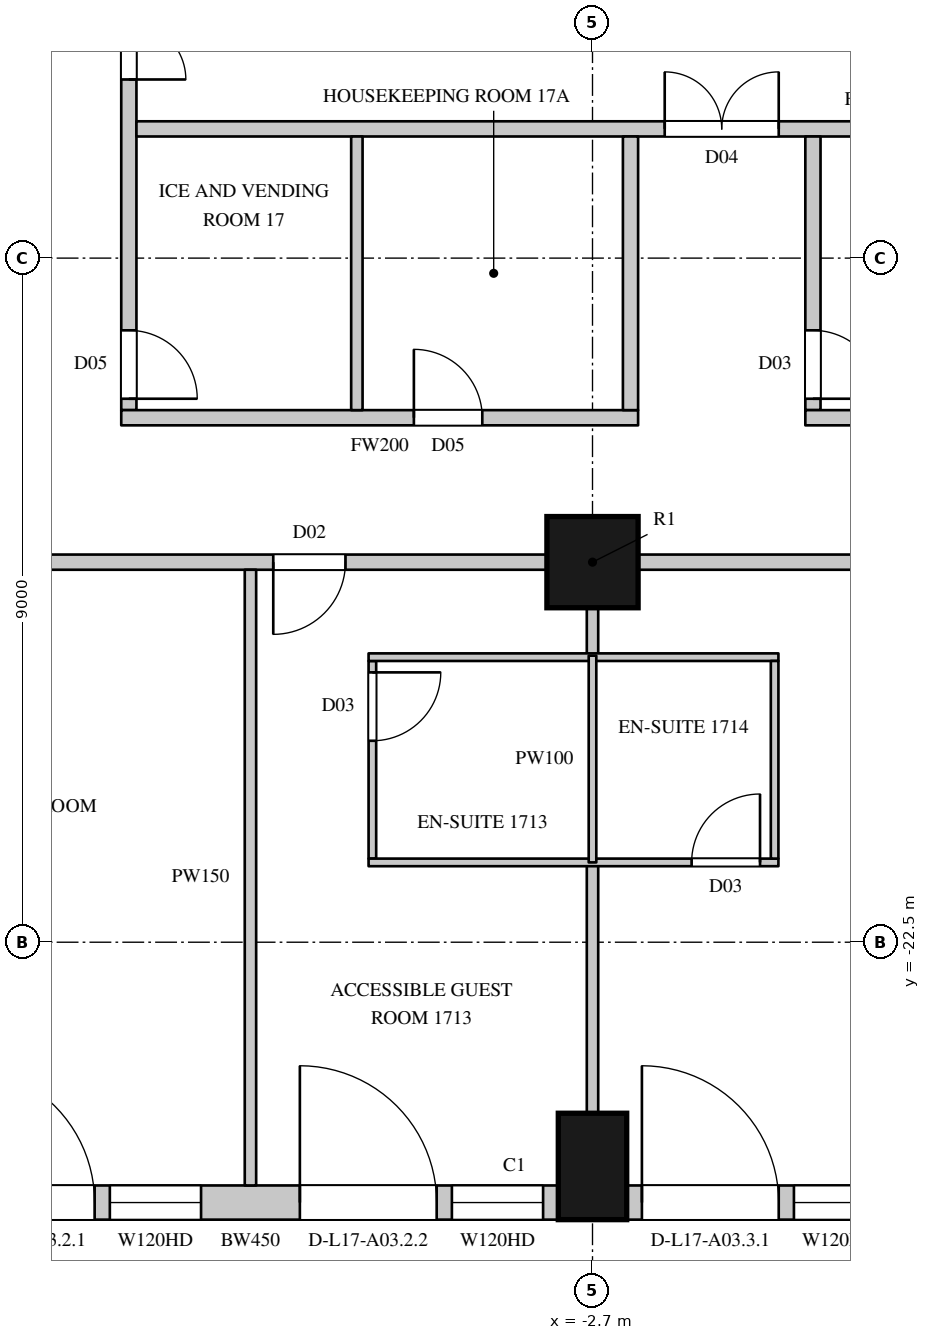
"""IFC4 building model, lengths in metres.
Left out: names, types, materials, properties, quantities, classifications, styles, units other than length and angle.
Written with IfcOpenShell. Run it as: python <this file> out.ifc"""

import sys

from ifc_helpers import new_model, si_unit, direction, frame, frame_2d, origin, origin_2d, place, context, subcontext, project, spatial, rectangle, circle, extrude, element, fill, save


model = new_model("IFC4")
c1 = context("Model", 3, precision=1e-05, world=origin(), true_north=direction((0.0, 1.0)))
c2 = subcontext(c1, "Body", "Model", "MODEL_VIEW")
j1 = project(units=[si_unit("LENGTHUNIT", "METRE"), si_unit("PLANEANGLEUNIT", "RADIAN")], contexts=[c1])
p1 = place(None, origin())
s1 = spatial("IfcSite", under=j1, at=p1, CompositionType="ELEMENT")
p2 = place(p1, origin())
s2 = spatial("IfcBuilding", under=s1, at=p2, CompositionType="ELEMENT")
p3 = place(p2, frame((0.0, 0.0, 91.5)))
s3 = spatial("IfcBuildingStorey", under=s2, at=p3, CompositionType="ELEMENT", Elevation=91.5)
p4 = place(p3, frame((-2.7, -25.45, 0.0), z_axis=(0.0, 0.0, 1.0), x_axis=(1.0, 0.0, 0.0)))
e1 = element("IfcColumn", 1, at=p4, inside=s3, PredefinedType="COLUMN", context=c2, shape_type="SweptSolid", body=[
    extrude(rectangle(XDim=0.9, YDim=1.4, at=origin_2d()), origin(), (0.0, 0.0, 1.0), 3.6),
])
p5 = place(p3, frame((-2.7, -17.5, 0.0), z_axis=(0.0, 0.0, 1.0), x_axis=(1.0, 0.0, 0.0)))
e2 = element("IfcColumn", 2, at=p5, inside=s3, PredefinedType="COLUMN", context=c2, shape_type="SweptSolid", body=[
    extrude(circle(Radius=0.6, at=origin_2d()), origin(), (0.0, 0.0, 1.0), 3.6),
])
p6 = place(p3, frame((-11.25, -25.925, 0.0), z_axis=(0.0, 0.0, 1.0), x_axis=(1.0, 0.0, 0.0)))
e3 = element("IfcWall", 3, at=p6, inside=s3, PredefinedType="SOLIDWALL", context=c2, shape_type="SweptSolid", body=[
    extrude(rectangle(XDim=8.1, YDim=0.45, at=frame_2d((4.05, 0.0))), origin(), (0.0, 0.0, 1.0), 3.3),
])
p7 = place(p6, frame((0.2, 0.0, 0.0)))
e4 = element("IfcOpeningElement", 4, at=p7, cuts=e3, PredefinedType="OPENING", context=c2, shape_type="SweptSolid", body=[
    extrude(rectangle(XDim=1.8, YDim=2.4, at=frame_2d((0.9, 1.2))), frame((0.0, 0.235, 0.0), z_axis=(0.0, -1.0, 0.0), x_axis=(1.0, 0.0, 0.0)), (0.0, 0.0, 1.0), 0.47),
])
p8 = place(p6, frame((2.2, 0.0, 1.05)))
e5 = element("IfcOpeningElement", 5, at=p8, cuts=e3, PredefinedType="OPENING", context=c2, shape_type="SweptSolid", body=[
    extrude(rectangle(XDim=1.2, YDim=2.0, at=frame_2d((0.6, 1.0))), frame((0.0, 0.235, 0.0), z_axis=(0.0, -1.0, 0.0), x_axis=(1.0, 0.0, 0.0)), (0.0, 0.0, 1.0), 0.47),
])
p9 = place(p6, frame((4.7, 0.0, 0.0)))
e6 = element("IfcOpeningElement", 6, at=p9, cuts=e3, PredefinedType="OPENING", context=c2, shape_type="SweptSolid", body=[
    extrude(rectangle(XDim=1.8, YDim=2.4, at=frame_2d((0.9, 1.2))), frame((0.0, 0.235, 0.0), z_axis=(0.0, -1.0, 0.0), x_axis=(1.0, 0.0, 0.0)), (0.0, 0.0, 1.0), 0.47),
])
p10 = place(p6, frame((6.7, 0.0, 1.05)))
e7 = element("IfcOpeningElement", 7, at=p10, cuts=e3, PredefinedType="OPENING", context=c2, shape_type="SweptSolid", body=[
    extrude(rectangle(XDim=1.2, YDim=2.0, at=frame_2d((0.6, 1.0))), frame((0.0, 0.235, 0.0), z_axis=(0.0, -1.0, 0.0), x_axis=(1.0, 0.0, 0.0)), (0.0, 0.0, 1.0), 0.47),
])
p11 = place(p3, frame((-2.25, -25.925, 0.0), z_axis=(0.0, 0.0, 1.0), x_axis=(1.0, 0.0, 0.0)))
e8 = element("IfcWall", 8, at=p11, inside=s3, PredefinedType="SOLIDWALL", context=c2, shape_type="SweptSolid", body=[
    extrude(rectangle(XDim=8.1, YDim=0.45, at=frame_2d((4.05, 0.0))), origin(), (0.0, 0.0, 1.0), 3.3),
])
p12 = place(p11, frame((0.2, 0.0, 0.0)))
e9 = element("IfcOpeningElement", 9, at=p12, cuts=e8, PredefinedType="OPENING", context=c2, shape_type="SweptSolid", body=[
    extrude(rectangle(XDim=1.8, YDim=2.4, at=frame_2d((0.9, 1.2))), frame((0.0, 0.235, 0.0), z_axis=(0.0, -1.0, 0.0), x_axis=(1.0, 0.0, 0.0)), (0.0, 0.0, 1.0), 0.47),
])
p13 = place(p11, frame((2.2, 0.0, 1.05)))
e10 = element("IfcOpeningElement", 10, at=p13, cuts=e8, PredefinedType="OPENING", context=c2, shape_type="SweptSolid", body=[
    extrude(rectangle(XDim=1.2, YDim=2.0, at=frame_2d((0.6, 1.0))), frame((0.0, 0.235, 0.0), z_axis=(0.0, -1.0, 0.0), x_axis=(1.0, 0.0, 0.0)), (0.0, 0.0, 1.0), 0.47),
])
p14 = place(p11, frame((4.7, 0.0, 0.0)))
e11 = element("IfcOpeningElement", 11, at=p14, cuts=e8, PredefinedType="OPENING", context=c2, shape_type="SweptSolid", body=[
    extrude(rectangle(XDim=1.8, YDim=2.4, at=frame_2d((0.9, 1.2))), frame((0.0, 0.235, 0.0), z_axis=(0.0, -1.0, 0.0), x_axis=(1.0, 0.0, 0.0)), (0.0, 0.0, 1.0), 0.47),
])
p15 = place(p11, frame((6.7, 0.0, 1.05)))
e12 = element("IfcOpeningElement", 12, at=p15, cuts=e8, PredefinedType="OPENING", context=c2, shape_type="SweptSolid", body=[
    extrude(rectangle(XDim=1.2, YDim=2.0, at=frame_2d((0.6, 1.0))), frame((0.0, 0.235, 0.0), z_axis=(0.0, -1.0, 0.0), x_axis=(1.0, 0.0, 0.0)), (0.0, 0.0, 1.0), 0.47),
])
p16 = place(p3, frame((-11.1, -17.5, 0.0), z_axis=(0.0, 0.0, 1.0), x_axis=(1.0, 0.0, 0.0)))
e13 = element("IfcWall", 13, at=p16, inside=s3, PredefinedType="PARTITIONING", context=c2, shape_type="SweptSolid", body=[
    extrude(rectangle(XDim=7.8, YDim=0.2, at=frame_2d((3.9, 0.0))), origin(), (0.0, 0.0, 1.0), 2.75),
])
p17 = place(p16, frame((4.2, 0.0, 0.0)))
e14 = element("IfcOpeningElement", 14, at=p17, cuts=e13, PredefinedType="OPENING", context=c2, shape_type="SweptSolid", body=[
    extrude(rectangle(XDim=0.95, YDim=2.2, at=frame_2d((0.475, 1.1))), frame((0.0, 0.11, 0.0), z_axis=(0.0, -1.0, 0.0), x_axis=(1.0, 0.0, 0.0)), (0.0, 0.0, 1.0), 0.22),
])
p18 = place(p3, frame((-2.1, -17.5, 0.0), z_axis=(0.0, 0.0, 1.0), x_axis=(1.0, 0.0, 0.0)))
e15 = element("IfcWall", 15, at=p18, inside=s3, PredefinedType="PARTITIONING", context=c2, shape_type="SweptSolid", body=[
    extrude(rectangle(XDim=7.8, YDim=0.2, at=frame_2d((3.9, 0.0))), origin(), (0.0, 0.0, 1.0), 2.75),
])
p19 = place(p18, frame((4.15, 0.0, 0.0)))
e16 = element("IfcOpeningElement", 16, at=p19, cuts=e15, PredefinedType="OPENING", context=c2, shape_type="SweptSolid", body=[
    extrude(rectangle(XDim=0.95, YDim=2.2, at=frame_2d((0.475, 1.1))), frame((0.0, 0.11, 0.0), z_axis=(0.0, -1.0, 0.0), x_axis=(1.0, 0.0, 0.0)), (0.0, 0.0, 1.0), 0.22),
])
p20 = place(p3, frame((-8.8, -15.5, 0.0), z_axis=(0.0, 0.0, 1.0), x_axis=(0.0, 1.0, 0.0)))
e17 = element("IfcWall", 17, at=p20, inside=s3, PredefinedType="PARTITIONING", context=c2, shape_type="SweptSolid", body=[
    extrude(rectangle(XDim=27.2, YDim=0.2, at=frame_2d((13.6, 0.0))), origin(), (0.0, 0.0, 1.0), 3.3),
])
p21 = place(p20, frame((19.25, 0.0, 0.0)))
e18 = element("IfcOpeningElement", 18, at=p21, cuts=e17, PredefinedType="OPENING", context=c2, shape_type="SweptSolid", body=[
    extrude(rectangle(XDim=1.5, YDim=2.2, at=frame_2d((0.75, 1.1))), frame((0.0, 0.11, 0.0), z_axis=(0.0, -1.0, 0.0), x_axis=(1.0, 0.0, 0.0)), (0.0, 0.0, 1.0), 0.22),
])
p22 = place(p20, frame((4.35, 0.0, 0.0)))
e19 = element("IfcOpeningElement", 19, at=p22, cuts=e17, PredefinedType="OPENING", context=c2, shape_type="SweptSolid", body=[
    extrude(rectangle(XDim=1.5, YDim=2.2, at=frame_2d((0.75, 1.1))), frame((0.0, 0.11, 0.0), z_axis=(0.0, -1.0, 0.0), x_axis=(1.0, 0.0, 0.0)), (0.0, 0.0, 1.0), 0.22),
])
p23 = place(p20, frame((25.55, 0.0, 0.0)))
e20 = element("IfcOpeningElement", 20, at=p23, cuts=e17, PredefinedType="OPENING", context=c2, shape_type="SweptSolid", body=[
    extrude(rectangle(XDim=1.5, YDim=2.2, at=frame_2d((0.75, 1.1))), frame((0.0, 0.11, 0.0), z_axis=(0.0, -1.0, 0.0), x_axis=(1.0, 0.0, 0.0)), (0.0, 0.0, 1.0), 0.22),
])
p24 = place(p20, frame((0.15, 0.0, 0.0)))
e21 = element("IfcOpeningElement", 21, at=p24, cuts=e17, PredefinedType="OPENING", context=c2, shape_type="SweptSolid", body=[
    extrude(rectangle(XDim=0.9, YDim=2.2, at=frame_2d((0.45, 1.1))), frame((0.0, 0.11, 0.0), z_axis=(0.0, -1.0, 0.0), x_axis=(1.0, 0.0, 0.0)), (0.0, 0.0, 1.0), 0.22),
])
p25 = place(p3, frame((-8.9, -15.6, 0.0), z_axis=(0.0, 0.0, 1.0), x_axis=(1.0, 0.0, 0.0)))
e22 = element("IfcWall", 22, at=p25, inside=s3, PredefinedType="PARTITIONING", context=c2, shape_type="SweptSolid", body=[
    extrude(rectangle(XDim=6.8, YDim=0.2, at=frame_2d((3.4, 0.0))), origin(), (0.0, 0.0, 1.0), 3.3),
])
p26 = place(p25, frame((3.85, 0.0, 0.0)))
e23 = element("IfcOpeningElement", 23, at=p26, cuts=e22, PredefinedType="OPENING", context=c2, shape_type="SweptSolid", body=[
    extrude(rectangle(XDim=0.9, YDim=2.2, at=frame_2d((0.45, 1.1))), frame((0.0, 0.11, 0.0), z_axis=(0.0, -1.0, 0.0), x_axis=(1.0, 0.0, 0.0)), (0.0, 0.0, 1.0), 0.22),
])
p27 = place(p3, frame((-8.7, -11.8, 0.0), z_axis=(0.0, 0.0, 1.0), x_axis=(1.0, 0.0, 0.0)))
e24 = element("IfcWall", 24, at=p27, inside=s3, PredefinedType="PARTITIONING", context=c2, shape_type="SweptSolid", body=[
    extrude(rectangle(XDim=19.4, YDim=0.2, at=frame_2d((9.7, 0.0))), origin(), (0.0, 0.0, 1.0), 3.3),
])
p28 = place(p27, frame((6.95, 0.0, 0.0)))
e25 = element("IfcOpeningElement", 25, at=p28, cuts=e24, PredefinedType="OPENING", context=c2, shape_type="SweptSolid", body=[
    extrude(rectangle(XDim=1.5, YDim=2.2, at=frame_2d((0.75, 1.1))), frame((0.0, 0.11, 0.0), z_axis=(0.0, -1.0, 0.0), x_axis=(1.0, 0.0, 0.0)), (0.0, 0.0, 1.0), 0.22),
])
p29 = place(p3, frame((-2.2, -15.5, 0.0), z_axis=(0.0, 0.0, 1.0), x_axis=(0.0, 1.0, 0.0)))
e26 = element("IfcWall", 26, at=p29, inside=s3, PredefinedType="PARTITIONING", context=c2, shape_type="SweptSolid", body=[
    extrude(rectangle(XDim=3.6, YDim=0.2, at=frame_2d((1.8, 0.0))), origin(), (0.0, 0.0, 1.0), 3.3),
])
p30 = place(p3, frame((0.2, -15.5, 0.0), z_axis=(0.0, 0.0, 1.0), x_axis=(0.0, 1.0, 0.0)))
e27 = element("IfcWall", 27, at=p30, inside=s3, PredefinedType="PARTITIONING", context=c2, shape_type="SweptSolid", body=[
    extrude(rectangle(XDim=3.6, YDim=0.2, at=frame_2d((1.8, 0.0))), origin(), (0.0, 0.0, 1.0), 3.3),
])
p31 = place(p30, frame((0.15, 0.0, 0.0)))
e28 = element("IfcOpeningElement", 28, at=p31, cuts=e27, PredefinedType="OPENING", context=c2, shape_type="SweptSolid", body=[
    extrude(rectangle(XDim=0.9, YDim=2.2, at=frame_2d((0.45, 1.1))), frame((0.0, 0.11, 0.0), z_axis=(0.0, -1.0, 0.0), x_axis=(1.0, 0.0, 0.0)), (0.0, 0.0, 1.0), 0.22),
])
p32 = place(p3, frame((0.1, -15.6, 0.0), z_axis=(0.0, 0.0, 1.0), x_axis=(1.0, 0.0, 0.0)))
e29 = element("IfcWall", 29, at=p32, inside=s3, PredefinedType="PARTITIONING", context=c2, shape_type="SweptSolid", body=[
    extrude(rectangle(XDim=14.2, YDim=0.2, at=frame_2d((7.1, 0.0))), origin(), (0.0, 0.0, 1.0), 3.3),
])
p33 = place(p3, frame((-7.2, -25.7, 0.0), z_axis=(0.0, 0.0, 1.0), x_axis=(0.0, 1.0, 0.0)))
e30 = element("IfcWall", 30, at=p33, inside=s3, PredefinedType="PARTITIONING", context=c2, shape_type="SweptSolid", body=[
    extrude(rectangle(XDim=8.1, YDim=0.15, at=frame_2d((4.05, 0.0))), origin(), (0.0, 0.0, 1.0), 2.65),
])
p34 = place(p3, frame((-5.8, -15.5, 0.0), z_axis=(0.0, 0.0, 1.0), x_axis=(0.0, 1.0, 0.0)))
e31 = element("IfcWall", 31, at=p34, inside=s3, PredefinedType="PARTITIONING", context=c2, shape_type="SweptSolid", body=[
    extrude(rectangle(XDim=3.6, YDim=0.15, at=frame_2d((1.8, 0.0))), origin(), (0.0, 0.0, 1.0), 3.3),
])
p35 = place(p3, frame((-2.7, -24.75, 0.0), z_axis=(0.0, 0.0, 1.0), x_axis=(0.0, 1.0, 0.0)))
e32 = element("IfcWall", 32, at=p35, inside=s3, PredefinedType="PARTITIONING", context=c2, shape_type="SweptSolid", body=[
    extrude(rectangle(XDim=3.3, YDim=0.15, at=frame_2d((1.65, 0.0))), origin(), (0.0, 0.0, 1.0), 2.75),
])
p36 = place(p3, frame((-2.7, -18.73, 0.0), z_axis=(0.0, 0.0, 1.0), x_axis=(0.0, 1.0, 0.0)))
e33 = element("IfcWall", 33, at=p36, inside=s3, PredefinedType="PARTITIONING", context=c2, shape_type="SweptSolid", body=[
    extrude(rectangle(XDim=0.63, YDim=0.15, at=frame_2d((0.315, 0.0))), origin(), (0.0, 0.0, 1.0), 2.75),
])
p37 = place(p3, frame((-5.596, -21.4, 0.0), z_axis=(0.0, 0.0, 1.0), x_axis=(0.0, 1.0, 0.0)))
e34 = element("IfcWall", 34, at=p37, inside=s3, PredefinedType="PARTITIONING", context=c2, shape_type="SweptSolid", body=[
    extrude(rectangle(XDim=2.6, YDim=0.1, at=frame_2d((1.3, 0.0))), origin(), (0.0, 0.0, 1.0), 3.3),
])
p38 = place(p37, frame((1.55, 0.0, 0.0)))
e35 = element("IfcOpeningElement", 35, at=p38, cuts=e34, PredefinedType="OPENING", context=c2, shape_type="SweptSolid", body=[
    extrude(rectangle(XDim=0.9, YDim=2.2, at=frame_2d((0.45, 1.1))), frame((0.0, 0.06, 0.0), z_axis=(0.0, -1.0, 0.0), x_axis=(1.0, 0.0, 0.0)), (0.0, 0.0, 1.0), 0.12),
])
p39 = place(p3, frame((-5.646, -21.45, 0.0), z_axis=(0.0, 0.0, 1.0), x_axis=(1.0, 0.0, 0.0)))
e36 = element("IfcWall", 36, at=p39, inside=s3, PredefinedType="PARTITIONING", context=c2, shape_type="SweptSolid", body=[
    extrude(rectangle(XDim=5.392, YDim=0.1, at=frame_2d((2.696, 0.0))), origin(), (0.0, 0.0, 1.0), 3.3),
])
p40 = place(p39, frame((4.25, 0.0, 0.0)))
e37 = element("IfcOpeningElement", 37, at=p40, cuts=e36, PredefinedType="OPENING", context=c2, shape_type="SweptSolid", body=[
    extrude(rectangle(XDim=0.9, YDim=2.2, at=frame_2d((0.45, 1.1))), frame((0.0, 0.06, 0.0), z_axis=(0.0, -1.0, 0.0), x_axis=(1.0, 0.0, 0.0)), (0.0, 0.0, 1.0), 0.12),
])
p41 = place(p3, frame((-5.646, -18.75, 0.0), z_axis=(0.0, 0.0, 1.0), x_axis=(1.0, 0.0, 0.0)))
e38 = element("IfcWall", 38, at=p41, inside=s3, PredefinedType="PARTITIONING", context=c2, shape_type="SweptSolid", body=[
    extrude(rectangle(XDim=5.392, YDim=0.1, at=frame_2d((2.696, 0.0))), origin(), (0.0, 0.0, 1.0), 3.3),
])
p42 = place(p3, frame((-2.7, -21.45, 0.0), z_axis=(0.0, 0.0, 1.0), x_axis=(0.0, 1.0, 0.0)))
e39 = element("IfcWall", 39, at=p42, inside=s3, PredefinedType="PARTITIONING", context=c2, shape_type="SweptSolid", body=[
    extrude(rectangle(XDim=2.72, YDim=0.1, at=frame_2d((1.36, 0.0))), origin(), (0.0, 0.0, 1.0), 2.75),
])
p43 = place(p3, frame((-0.304, -21.4, 0.0), z_axis=(0.0, 0.0, 1.0), x_axis=(0.0, 1.0, 0.0)))
e40 = element("IfcWall", 40, at=p43, inside=s3, PredefinedType="PARTITIONING", context=c2, shape_type="SweptSolid", body=[
    extrude(rectangle(XDim=2.6, YDim=0.1, at=frame_2d((1.3, 0.0))), origin(), (0.0, 0.0, 1.0), 3.3),
])
p44 = place(p7, origin())
e41 = element("IfcDoor", 41, at=p44, inside=s3, OperationType="SLIDING_TO_LEFT", PredefinedType="DOOR", context=c2, shape_type="SweptSolid", body=[
    extrude(rectangle(XDim=1.8, YDim=2.4, at=frame_2d((0.9, 1.2))), frame((0.0, 0.13, 0.0), z_axis=(0.0, -1.0, 0.0), x_axis=(1.0, 0.0, 0.0)), (0.0, 0.0, 1.0), 0.05),
])
fill(e4, e41)
p45 = place(p8, origin())
e42 = element("IfcWindow", 42, at=p45, inside=s3, PartitioningType="SINGLE_PANEL", PredefinedType="WINDOW", context=c2, shape_type="SweptSolid", body=[
    extrude(rectangle(XDim=1.2, YDim=2.0, at=frame_2d((0.6, 1.0))), frame((0.0, 0.135, 0.0), z_axis=(0.0, -1.0, 0.0), x_axis=(1.0, 0.0, 0.0)), (0.0, 0.0, 1.0), 0.06),
])
fill(e5, e42)
p46 = place(p9, origin())
e43 = element("IfcDoor", 43, at=p46, inside=s3, OperationType="SLIDING_TO_LEFT", PredefinedType="DOOR", context=c2, shape_type="SweptSolid", body=[
    extrude(rectangle(XDim=1.8, YDim=2.4, at=frame_2d((0.9, 1.2))), frame((0.0, 0.13, 0.0), z_axis=(0.0, -1.0, 0.0), x_axis=(1.0, 0.0, 0.0)), (0.0, 0.0, 1.0), 0.05),
])
fill(e6, e43)
p47 = place(p10, origin())
e44 = element("IfcWindow", 44, at=p47, inside=s3, PartitioningType="SINGLE_PANEL", PredefinedType="WINDOW", context=c2, shape_type="SweptSolid", body=[
    extrude(rectangle(XDim=1.2, YDim=2.0, at=frame_2d((0.6, 1.0))), frame((0.0, 0.135, 0.0), z_axis=(0.0, -1.0, 0.0), x_axis=(1.0, 0.0, 0.0)), (0.0, 0.0, 1.0), 0.06),
])
fill(e7, e44)
p48 = place(p12, origin())
e45 = element("IfcDoor", 45, at=p48, inside=s3, OperationType="SLIDING_TO_LEFT", PredefinedType="DOOR", context=c2, shape_type="SweptSolid", body=[
    extrude(rectangle(XDim=1.8, YDim=2.4, at=frame_2d((0.9, 1.2))), frame((0.0, 0.13, 0.0), z_axis=(0.0, -1.0, 0.0), x_axis=(1.0, 0.0, 0.0)), (0.0, 0.0, 1.0), 0.05),
])
fill(e9, e45)
p49 = place(p13, origin())
e46 = element("IfcWindow", 46, at=p49, inside=s3, PartitioningType="SINGLE_PANEL", PredefinedType="WINDOW", context=c2, shape_type="SweptSolid", body=[
    extrude(rectangle(XDim=1.2, YDim=2.0, at=frame_2d((0.6, 1.0))), frame((0.0, 0.135, 0.0), z_axis=(0.0, -1.0, 0.0), x_axis=(1.0, 0.0, 0.0)), (0.0, 0.0, 1.0), 0.06),
])
fill(e10, e46)
p50 = place(p22, origin())
e47 = element("IfcDoor", 47, at=p50, inside=s3, OperationType="DOUBLE_DOOR_SINGLE_SWING", PredefinedType="DOOR", context=c2, shape_type="SweptSolid", body=[
    extrude(rectangle(XDim=1.5, YDim=2.2, at=frame_2d((0.75, 1.1))), frame((0.0, 0.025, 0.0), z_axis=(0.0, -1.0, 0.0), x_axis=(1.0, 0.0, 0.0)), (0.0, 0.0, 1.0), 0.05),
])
fill(e19, e47)
p51 = place(p28, origin())
e48 = element("IfcDoor", 48, at=p51, inside=s3, OperationType="DOUBLE_DOOR_SINGLE_SWING", PredefinedType="DOOR", context=c2, shape_type="SweptSolid", body=[
    extrude(rectangle(XDim=1.5, YDim=2.2, at=frame_2d((0.75, 1.1))), frame((0.0, 0.025, 0.0), z_axis=(0.0, -1.0, 0.0), x_axis=(1.0, 0.0, 0.0)), (0.0, 0.0, 1.0), 0.05),
])
fill(e25, e48)
p52 = place(p24, origin())
e49 = element("IfcDoor", 49, at=p52, inside=s3, OperationType="SINGLE_SWING_RIGHT", PredefinedType="DOOR", context=c2, shape_type="SweptSolid", body=[
    extrude(rectangle(XDim=0.9, YDim=2.2, at=frame_2d((0.45, 1.1))), frame((0.0, 0.025, 0.0), z_axis=(0.0, -1.0, 0.0), x_axis=(1.0, 0.0, 0.0)), (0.0, 0.0, 1.0), 0.05),
])
fill(e21, e49)
p53 = place(p26, origin())
e50 = element("IfcDoor", 50, at=p53, inside=s3, OperationType="SINGLE_SWING_LEFT", PredefinedType="DOOR", context=c2, shape_type="SweptSolid", body=[
    extrude(rectangle(XDim=0.9, YDim=2.2, at=frame_2d((0.45, 1.1))), frame((0.0, 0.025, 0.0), z_axis=(0.0, -1.0, 0.0), x_axis=(1.0, 0.0, 0.0)), (0.0, 0.0, 1.0), 0.05),
])
fill(e23, e50)
p54 = place(p31, origin())
e51 = element("IfcDoor", 51, at=p54, inside=s3, OperationType="SINGLE_SWING_RIGHT", PredefinedType="DOOR", context=c2, shape_type="SweptSolid", body=[
    extrude(rectangle(XDim=0.9, YDim=2.2, at=frame_2d((0.45, 1.1))), frame((0.0, 0.025, 0.0), z_axis=(0.0, -1.0, 0.0), x_axis=(1.0, 0.0, 0.0)), (0.0, 0.0, 1.0), 0.05),
])
fill(e28, e51)
p55 = place(p17, origin())
e52 = element("IfcDoor", 52, at=p55, inside=s3, OperationType="SINGLE_SWING_RIGHT", PredefinedType="DOOR", context=c2, shape_type="SweptSolid", body=[
    extrude(rectangle(XDim=0.95, YDim=2.2, at=frame_2d((0.475, 1.1))), frame((0.0, 0.025, 0.0), z_axis=(0.0, -1.0, 0.0), x_axis=(1.0, 0.0, 0.0)), (0.0, 0.0, 1.0), 0.05),
])
fill(e14, e52)
p56 = place(p38, origin())
e53 = element("IfcDoor", 53, at=p56, inside=s3, OperationType="SINGLE_SWING_LEFT", PredefinedType="DOOR", context=c2, shape_type="SweptSolid", body=[
    extrude(rectangle(XDim=0.9, YDim=2.2, at=frame_2d((0.45, 1.1))), frame((0.0, 0.025, 0.0), z_axis=(0.0, -1.0, 0.0), x_axis=(1.0, 0.0, 0.0)), (0.0, 0.0, 1.0), 0.05),
])
fill(e35, e53)
p57 = place(p40, origin())
e54 = element("IfcDoor", 54, at=p57, inside=s3, OperationType="SINGLE_SWING_RIGHT", PredefinedType="DOOR", context=c2, shape_type="SweptSolid", body=[
    extrude(rectangle(XDim=0.9, YDim=2.2, at=frame_2d((0.45, 1.1))), frame((0.0, 0.025, 0.0), z_axis=(0.0, -1.0, 0.0), x_axis=(1.0, 0.0, 0.0)), (0.0, 0.0, 1.0), 0.05),
])
fill(e37, e54)
save(model, sys.argv[1])
